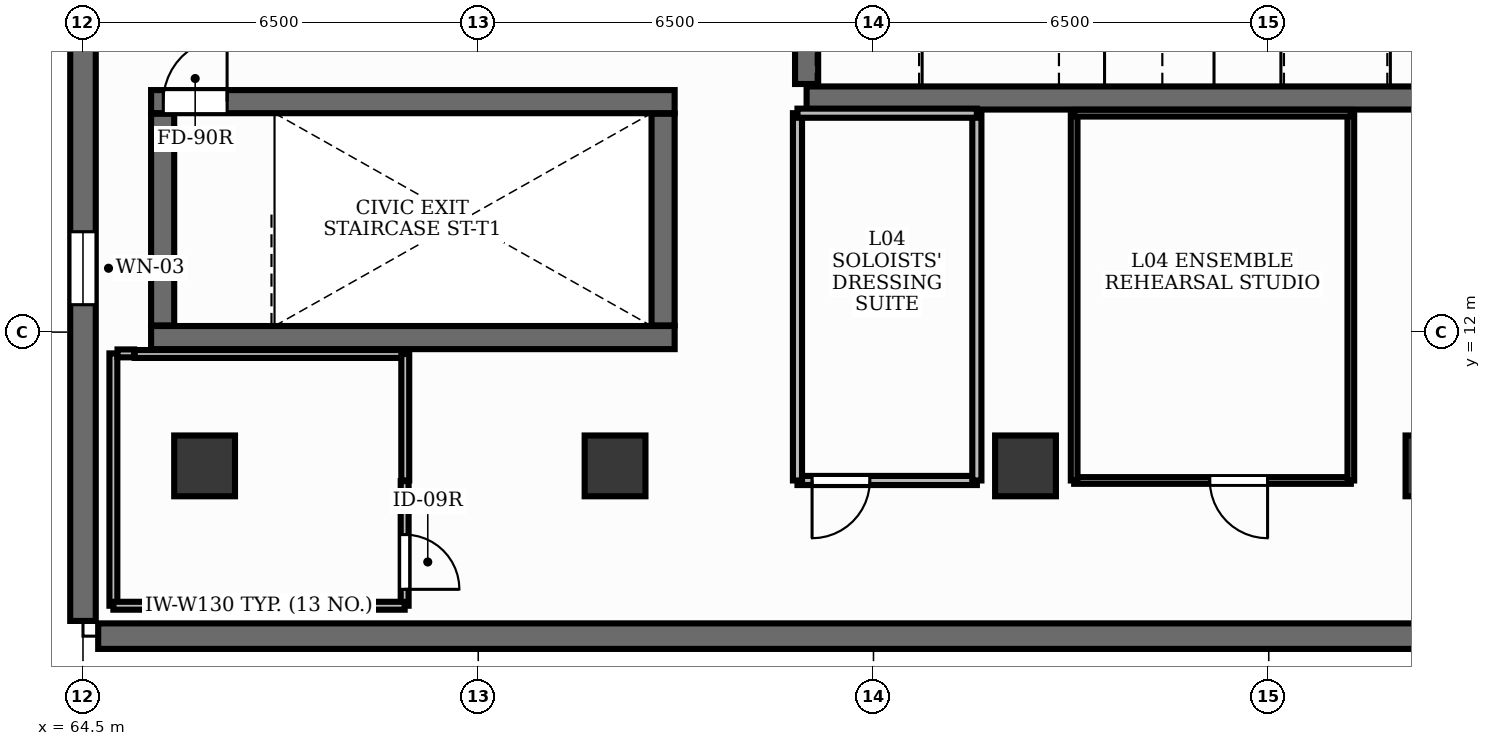
"""IFC4 building model, lengths in metres.
Left out: names, types, materials, properties, quantities, classifications, styles, units other than length and angle.
Written with IfcOpenShell. Run it as: python <this file> out.ifc"""

import sys

from ifc_helpers import new_model, si_unit, direction, frame, frame_2d, origin, origin_2d, place, context, subcontext, project, spatial, rectangle, extrude, element, fill, save


model = new_model("IFC4")
c1 = context("Model", 3, precision=1e-05, world=origin(), true_north=direction((0.0, 1.0)))
c2 = subcontext(c1, "Body", "Model", "MODEL_VIEW")
j1 = project(units=[si_unit("LENGTHUNIT", "METRE"), si_unit("PLANEANGLEUNIT", "RADIAN")], contexts=[c1])
p1 = place(None, origin())
s1 = spatial("IfcSite", under=j1, at=p1, CompositionType="ELEMENT")
p2 = place(p1, origin())
s2 = spatial("IfcBuilding", under=s1, at=p2, CompositionType="ELEMENT")
p3 = place(p2, frame((0.0, 0.0, 20.4)))
s3 = spatial("IfcBuildingStorey", under=s2, at=p3, CompositionType="ELEMENT", Elevation=20.4)
for number, where, z_axis, x_axis in (
    (1, (66.5, 9.8, 0.0), (0.0, 0.0, 1.0), (1.0, 0.0, 0.0)),
    (2, (73.25, 9.8, 0.0), (0.0, 0.0, 1.0), (1.0, 0.0, 0.0)),
    (3, (80.0, 9.8, 0.0), (0.0, 0.0, 1.0), (1.0, 0.0, 0.0)),
    (4, (86.75, 9.8, 0.0), (0.0, 0.0, 1.0), (1.0, 0.0, 0.0)),
):
    element("IfcColumn", number, at=place(p3, frame(where, z_axis=z_axis, x_axis=x_axis)), inside=s3, PredefinedType="COLUMN", context=c2, shape_type="SweptSolid", body=[
        extrude(rectangle(XDim=1.0, YDim=1.0, at=origin_2d()), origin(), (0.0, 0.0, 1.0), 5.4),
    ])
p4 = place(p3, frame((64.5, 7.25, 0.0), z_axis=(0.0, 0.0, 1.0), x_axis=(0.0, 1.0, 0.0)))
e5 = element("IfcWall", 5, at=p4, inside=s3, PredefinedType="SHEAR", context=c2, shape_type="SweptSolid", body=[
    extrude(rectangle(XDim=39.5, YDim=0.42, at=frame_2d((19.75, 0.0))), origin(), (0.0, 0.0, 1.0), 5.4),
])
p5 = place(p4, frame((5.2, 0.0, 0.9)))
e6 = element("IfcOpeningElement", 6, at=p5, cuts=e5, PredefinedType="OPENING", context=c2, shape_type="SweptSolid", body=[
    extrude(rectangle(XDim=1.2, YDim=2.7, at=frame_2d((0.6, 1.35))), frame((0.0, 0.225, 0.0), z_axis=(0.0, -1.0, 0.0), x_axis=(1.0, 0.0, 0.0)), (0.0, 0.0, 1.0), 0.45),
])
p6 = place(p4, frame((12.2, 0.0, 0.9)))
e7 = element("IfcOpeningElement", 7, at=p6, cuts=e5, PredefinedType="OPENING", context=c2, shape_type="SweptSolid", body=[
    extrude(rectangle(XDim=1.2, YDim=2.7, at=frame_2d((0.6, 1.35))), frame((0.0, 0.225, 0.0), z_axis=(0.0, -1.0, 0.0), x_axis=(1.0, 0.0, 0.0)), (0.0, 0.0, 1.0), 0.45),
])
p7 = place(p4, frame((25.0, 0.0, 0.9)))
e8 = element("IfcOpeningElement", 8, at=p7, cuts=e5, PredefinedType="OPENING", context=c2, shape_type="SweptSolid", body=[
    extrude(rectangle(XDim=1.2, YDim=2.7, at=frame_2d((0.6, 1.35))), frame((0.0, 0.225, 0.0), z_axis=(0.0, -1.0, 0.0), x_axis=(1.0, 0.0, 0.0)), (0.0, 0.0, 1.0), 0.45),
])
p8 = place(p4, frame((31.8, 0.0, 0.9)))
e9 = element("IfcOpeningElement", 9, at=p8, cuts=e5, PredefinedType="OPENING", context=c2, shape_type="SweptSolid", body=[
    extrude(rectangle(XDim=1.2, YDim=2.7, at=frame_2d((0.6, 1.35))), frame((0.0, 0.225, 0.0), z_axis=(0.0, -1.0, 0.0), x_axis=(1.0, 0.0, 0.0)), (0.0, 0.0, 1.0), 0.45),
])
p9 = place(p3, frame((94.25, 7.0, 0.0), z_axis=(0.0, 0.0, 1.0), x_axis=(-1.0, 0.0, 0.0)))
e10 = element("IfcWall", 10, at=p9, inside=s3, PredefinedType="SHEAR", context=c2, shape_type="SweptSolid", body=[
    extrude(rectangle(XDim=29.5, YDim=0.42, at=frame_2d((14.75, 0.0))), origin(), (0.0, 0.0, 1.0), 5.4),
])
p10 = place(p3, frame((76.4, 15.85, 0.0), z_axis=(0.0, 0.0, 1.0), x_axis=(1.0, 0.0, 0.0)))
e11 = element("IfcWall", 11, at=p10, inside=s3, PredefinedType="SHEAR", context=c2, shape_type="SweptSolid", body=[
    extrude(rectangle(XDim=15.75, YDim=0.38, at=frame_2d((7.875, 0.0))), origin(), (0.0, 0.0, 1.0), 5.4),
])
p11 = place(p3, frame((76.4, 16.08, 0.0), z_axis=(0.0, 0.0, 1.0), x_axis=(0.0, 1.0, 0.0)))
e12 = element("IfcWall", 12, at=p11, inside=s3, PredefinedType="SHEAR", context=c2, shape_type="SweptSolid", body=[
    extrude(rectangle(XDim=21.84, YDim=0.38, at=frame_2d((10.92, 0.0))), origin(), (0.0, 0.0, 1.0), 5.4),
])
p12 = place(p3, frame((65.62, 11.91, 0.0), z_axis=(0.0, 0.0, 1.0), x_axis=(1.0, 0.0, 0.0)))
e13 = element("IfcWall", 13, at=p12, inside=s3, PredefinedType="SHEAR", context=c2, shape_type="SweptSolid", body=[
    extrude(rectangle(XDim=8.61, YDim=0.38, at=frame_2d((4.305, 0.0))), origin(), (0.0, 0.0, 1.0), 5.4),
])
p13 = place(p3, frame((65.62, 15.79, 0.0), z_axis=(0.0, 0.0, 1.0), x_axis=(1.0, 0.0, 0.0)))
e14 = element("IfcWall", 14, at=p13, inside=s3, PredefinedType="SHEAR", context=c2, shape_type="SweptSolid", body=[
    extrude(rectangle(XDim=8.61, YDim=0.38, at=frame_2d((4.305, 0.0))), origin(), (0.0, 0.0, 1.0), 5.4),
])
p14 = place(p13, frame((0.2, 0.0, 0.0)))
e15 = element("IfcOpeningElement", 15, at=p14, cuts=e14, PredefinedType="OPENING", context=c2, shape_type="SweptSolid", body=[
    extrude(rectangle(XDim=1.05, YDim=2.15, at=frame_2d((0.525, 1.075))), frame((0.0, 0.205, 0.0), z_axis=(0.0, -1.0, 0.0), x_axis=(1.0, 0.0, 0.0)), (0.0, 0.0, 1.0), 0.41),
])
for number, where, z_axis, x_axis in (
    (16, (74.04, 12.11, 0.0), (0.0, 0.0, 1.0), (0.0, 1.0, 0.0)),
    (17, (65.81, 12.11, 0.0), (0.0, 0.0, 1.0), (0.0, 1.0, 0.0)),
):
    element("IfcWall", number, at=place(p3, frame(where, z_axis=z_axis, x_axis=x_axis)), inside=s3, PredefinedType="SHEAR", context=c2, shape_type="SweptSolid", body=[
        extrude(rectangle(XDim=3.48, YDim=0.38, at=frame_2d((1.74, 0.0))), origin(), (0.0, 0.0, 1.0), 5.4),
    ])
p15 = place(p3, frame((69.79, 9.55, 0.0), z_axis=(0.0, 0.0, 1.0), x_axis=(0.0, -1.0, 0.0)))
e18 = element("IfcWall", 18, at=p15, inside=s3, PredefinedType="PARTITIONING", context=c2, shape_type="SweptSolid", body=[
    extrude(rectangle(XDim=2.05, YDim=0.13, at=frame_2d((1.025, 0.0))), origin(), (0.0, 0.0, 1.0), 4.11),
])
p16 = place(p15, frame((0.88, 0.0, 0.0)))
e19 = element("IfcOpeningElement", 19, at=p16, cuts=e18, PredefinedType="OPENING", context=c2, shape_type="SweptSolid", body=[
    extrude(rectangle(XDim=0.9, YDim=2.15, at=frame_2d((0.45, 1.075))), frame((0.0, 0.08, 0.0), z_axis=(0.0, -1.0, 0.0), x_axis=(1.0, 0.0, 0.0)), (0.0, 0.0, 1.0), 0.16),
])
p17 = place(p3, frame((79.2, 9.56, 0.0), z_axis=(0.0, 0.0, 1.0), x_axis=(-1.0, 0.0, 0.0)))
e20 = element("IfcWall", 20, at=p17, inside=s3, PredefinedType="PARTITIONING", context=c2, shape_type="SweptSolid", body=[
    extrude(rectangle(XDim=2.95, YDim=0.15, at=frame_2d((1.475, 0.0))), origin(), (0.0, 0.0, 1.0), 4.11),
])
p18 = place(p17, frame((1.76, 0.0, 0.0)))
e21 = element("IfcOpeningElement", 21, at=p18, cuts=e20, PredefinedType="OPENING", context=c2, shape_type="SweptSolid", body=[
    extrude(rectangle(XDim=0.95, YDim=2.15, at=frame_2d((0.475, 1.075))), frame((0.0, 0.09, 0.0), z_axis=(0.0, -1.0, 0.0), x_axis=(1.0, 0.0, 0.0)), (0.0, 0.0, 1.0), 0.18),
])
p19 = place(p3, frame((85.35, 9.56, 0.0), z_axis=(0.0, 0.0, 1.0), x_axis=(-1.0, 0.0, 0.0)))
e22 = element("IfcWall", 22, at=p19, inside=s3, PredefinedType="MOVABLE", context=c2, shape_type="SweptSolid", body=[
    extrude(rectangle(XDim=4.55, YDim=0.11, at=frame_2d((2.275, 0.0))), origin(), (0.0, 0.0, 1.0), 4.11),
])
p20 = place(p19, frame((1.369, 0.0, 0.0)))
e23 = element("IfcOpeningElement", 23, at=p20, cuts=e22, PredefinedType="OPENING", context=c2, shape_type="SweptSolid", body=[
    extrude(rectangle(XDim=0.95, YDim=2.15, at=frame_2d((0.475, 1.075))), frame((0.0, 0.07, 0.0), z_axis=(0.0, -1.0, 0.0), x_axis=(1.0, 0.0, 0.0)), (0.0, 0.0, 1.0), 0.14),
])
p21 = place(p3, frame((65.0, 7.5, 0.0), z_axis=(0.0, 0.0, 1.0), x_axis=(0.0, 1.0, 0.0)))
e24 = element("IfcWall", 24, at=p21, inside=s3, PredefinedType="PARTITIONING", context=c2, shape_type="SweptSolid", body=[
    extrude(rectangle(XDim=4.15, YDim=0.13, at=frame_2d((2.075, 0.0))), origin(), (0.0, 0.0, 1.0), 4.11),
])
p22 = place(p3, frame((65.068, 11.65, 0.0), z_axis=(0.0, 0.0, 1.0), x_axis=(1.0, 0.0, 0.0)))
e25 = element("IfcWall", 25, at=p22, inside=s3, PredefinedType="PARTITIONING", context=c2, shape_type="SweptSolid", body=[
    extrude(rectangle(XDim=0.272, YDim=0.13, at=frame_2d((0.136, 0.0))), origin(), (0.0, 0.0, 1.0), 4.11),
])
p23 = place(p3, frame((65.35, 11.64, 0.0), z_axis=(0.0, 0.0, 1.0), x_axis=(1.0, 0.0, 0.0)))
e26 = element("IfcWall", 26, at=p23, inside=s3, PredefinedType="PARTITIONING", context=c2, shape_type="SweptSolid", body=[
    extrude(rectangle(XDim=4.45, YDim=0.13, at=frame_2d((2.225, 0.0))), origin(), (0.0, 0.0, 1.0), 4.11),
])
p24 = place(p3, frame((69.8, 11.64, 0.0), z_axis=(0.0, 0.0, 1.0), x_axis=(0.0, -1.0, 0.0)))
e27 = element("IfcWall", 27, at=p24, inside=s3, PredefinedType="PARTITIONING", context=c2, shape_type="SweptSolid", body=[
    extrude(rectangle(XDim=2.08, YDim=0.13, at=frame_2d((1.04, 0.0))), origin(), (0.0, 0.0, 1.0), 4.11),
])
p25 = place(p3, frame((69.79, 7.5, 0.0), z_axis=(0.0, 0.0, 1.0), x_axis=(-1.0, 0.0, 0.0)))
e28 = element("IfcWall", 28, at=p25, inside=s3, PredefinedType="PARTITIONING", context=c2, shape_type="SweptSolid", body=[
    extrude(rectangle(XDim=4.79, YDim=0.13, at=frame_2d((2.395, 0.0))), origin(), (0.0, 0.0, 1.0), 4.11),
])
p26 = place(p3, frame((79.2, 15.6, 0.0), z_axis=(0.0, 0.0, 1.0), x_axis=(0.0, -1.0, 0.0)))
e29 = element("IfcWall", 29, at=p26, inside=s3, PredefinedType="PARTITIONING", context=c2, shape_type="SweptSolid", body=[
    extrude(rectangle(XDim=6.04, YDim=0.15, at=frame_2d((3.02, 0.0))), origin(), (0.0, 0.0, 1.0), 2.22),
])
p27 = place(p3, frame((76.25, 9.56, 0.0), z_axis=(0.0, 0.0, 1.0), x_axis=(0.0, 1.0, 0.0)))
e30 = element("IfcWall", 30, at=p27, inside=s3, PredefinedType="PARTITIONING", context=c2, shape_type="SweptSolid", body=[
    extrude(rectangle(XDim=6.04, YDim=0.15, at=frame_2d((3.02, 0.0))), origin(), (0.0, 0.0, 1.0), 4.11),
])
p28 = place(p3, frame((76.25, 15.6, 0.0), z_axis=(0.0, 0.0, 1.0), x_axis=(1.0, 0.0, 0.0)))
e31 = element("IfcWall", 31, at=p28, inside=s3, PredefinedType="PARTITIONING", context=c2, shape_type="SweptSolid", body=[
    extrude(rectangle(XDim=2.95, YDim=0.15, at=frame_2d((1.475, 0.0))), origin(), (0.0, 0.0, 1.0), 4.11),
])
for number, where, z_axis, x_axis in (
    (32, (85.35, 15.6, 0.0), (0.0, 0.0, 1.0), (0.0, -1.0, 0.0)),
    (33, (80.8, 9.56, 0.0), (0.0, 0.0, 1.0), (0.0, 1.0, 0.0)),
):
    element("IfcWall", number, at=place(p3, frame(where, z_axis=z_axis, x_axis=x_axis)), inside=s3, PredefinedType="MOVABLE", context=c2, shape_type="SweptSolid", body=[
        extrude(rectangle(XDim=6.04, YDim=0.11, at=frame_2d((3.02, 0.0))), origin(), (0.0, 0.0, 1.0), 4.11),
    ])
p29 = place(p3, frame((80.8, 15.6, 0.0), z_axis=(0.0, 0.0, 1.0), x_axis=(1.0, 0.0, 0.0)))
e34 = element("IfcWall", 34, at=p29, inside=s3, PredefinedType="MOVABLE", context=c2, shape_type="SweptSolid", body=[
    extrude(rectangle(XDim=4.55, YDim=0.11, at=frame_2d((2.275, 0.0))), origin(), (0.0, 0.0, 1.0), 4.11),
])
p30 = place(p5, origin())
e35 = element("IfcWindow", 35, at=p30, inside=s3, PartitioningType="SINGLE_PANEL", PredefinedType="WINDOW", context=c2, shape_type="SweptSolid", body=[
    extrude(rectangle(XDim=1.2, YDim=2.7, at=frame_2d((0.6, 1.35))), frame((0.0, 0.03, 0.0), z_axis=(0.0, -1.0, 0.0), x_axis=(1.0, 0.0, 0.0)), (0.0, 0.0, 1.0), 0.06),
])
fill(e6, e35)
p31 = place(p14, origin())
e36 = element("IfcDoor", 36, at=p31, inside=s3, OperationType="SINGLE_SWING_RIGHT", PredefinedType="DOOR", context=c2, shape_type="SweptSolid", body=[
    extrude(rectangle(XDim=1.05, YDim=2.15, at=frame_2d((0.525, 1.075))), frame((0.0, 0.025, 0.0), z_axis=(0.0, -1.0, 0.0), x_axis=(1.0, 0.0, 0.0)), (0.0, 0.0, 1.0), 0.05),
])
fill(e15, e36)
p32 = place(p16, origin())
e37 = element("IfcDoor", 37, at=p32, inside=s3, OperationType="SINGLE_SWING_RIGHT", PredefinedType="DOOR", context=c2, shape_type="SweptSolid", body=[
    extrude(rectangle(XDim=0.9, YDim=2.15, at=frame_2d((0.45, 1.075))), frame((0.0, 0.025, 0.0), z_axis=(0.0, -1.0, 0.0), x_axis=(1.0, 0.0, 0.0)), (0.0, 0.0, 1.0), 0.05),
])
fill(e19, e37)
p33 = place(p18, origin())
e38 = element("IfcDoor", 38, at=p33, inside=s3, OperationType="SINGLE_SWING_RIGHT", PredefinedType="DOOR", context=c2, shape_type="SweptSolid", body=[
    extrude(rectangle(XDim=0.95, YDim=2.15, at=frame_2d((0.475, 1.075))), frame((0.0, 0.025, 0.0), z_axis=(0.0, -1.0, 0.0), x_axis=(1.0, 0.0, 0.0)), (0.0, 0.0, 1.0), 0.05),
])
fill(e21, e38)
p34 = place(p20, origin())
e39 = element("IfcDoor", 39, at=p34, inside=s3, OperationType="SINGLE_SWING_LEFT", PredefinedType="DOOR", context=c2, shape_type="SweptSolid", body=[
    extrude(rectangle(XDim=0.95, YDim=2.15, at=frame_2d((0.475, 1.075))), frame((0.0, 0.025, 0.0), z_axis=(0.0, -1.0, 0.0), x_axis=(1.0, 0.0, 0.0)), (0.0, 0.0, 1.0), 0.05),
])
fill(e23, e39)
save(model, sys.argv[1])
